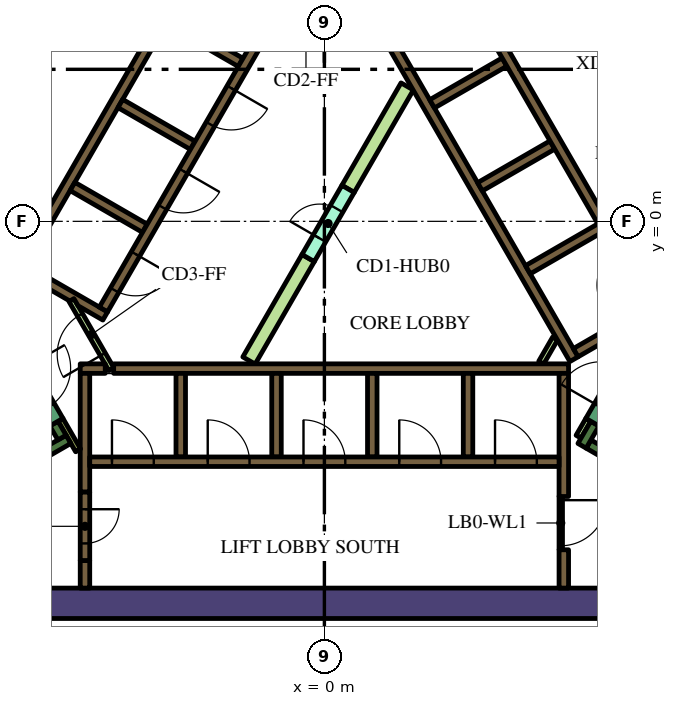
"""IFC4 building model, lengths in metres.
Left out: names, types, materials, properties, quantities, classifications, styles, units other than length and angle.
Written with IfcOpenShell. Run it as: python <this file> out.ifc"""

import sys

from ifc_helpers import new_model, si_unit, direction, frame, frame_2d, origin, place, context, subcontext, project, spatial, polyline, rectangle, outline, extrude, element, fill, save


model = new_model("IFC4")
c1 = context("Model", 3, precision=1e-05, world=origin(), true_north=direction((0.0, 1.0)))
c2 = subcontext(c1, "Body", "Model", "MODEL_VIEW")
j1 = project(units=[si_unit("LENGTHUNIT", "METRE"), si_unit("PLANEANGLEUNIT", "RADIAN")], contexts=[c1])
p1 = place(None, origin())
s1 = spatial("IfcSite", under=j1, at=p1, CompositionType="ELEMENT")
p2 = place(p1, origin())
s2 = spatial("IfcBuilding", under=s1, at=p2, CompositionType="ELEMENT")
p3 = place(p2, frame((0.0, 0.0, 183.6)))
s3 = spatial("IfcBuildingStorey", under=s2, at=p3, CompositionType="ELEMENT", Elevation=183.6)
p4 = place(p3, frame((-13.378, -10.05, 0.0), z_axis=(0.0, 0.0, 1.0), x_axis=(1.0, 0.0, 0.0)))
e1 = element("IfcWall", 1, at=p4, inside=s3, PredefinedType="SOLIDWALL", context=c2, shape_type="SweptSolid", body=[
    extrude(rectangle(XDim=22.282, YDim=0.8, at=frame_2d((11.141, 0.0))), origin(), (0.0, 0.0, 1.0), 4.2),
])
p5 = place(p3, frame((-12.668, -1.842, 0.0), z_axis=(0.0, 0.0, 1.0), x_axis=(0.500003640647, 0.866023301845, 0.0)))
e2 = element("IfcWall", 2, at=p5, inside=s3, PredefinedType="SOLIDWALL", context=c2, shape_type="SweptSolid", body=[
    extrude(rectangle(XDim=15.858, YDim=0.8, at=frame_2d((7.929, 0.0))), origin(), (0.0, 0.0, 1.0), 4.2),
])
p6 = place(p3, frame((12.84, -9.261, 0.0), z_axis=(0.0, 0.0, 1.0), x_axis=(-0.866013990052, 0.500019768644, 0.0)))
e3 = element("IfcWall", 3, at=p6, inside=s3, PredefinedType="SOLIDWALL", context=c2, shape_type="SweptSolid", body=[
    extrude(rectangle(XDim=6.8, YDim=0.25, at=frame_2d((3.4, 0.0))), origin(), (0.0, 0.0, 1.0), 4.2),
])
p7 = place(p3, frame((6.78, -5.906, 0.0), z_axis=(0.0, 0.0, 1.0), x_axis=(0.500223362819, 0.865896406789, 0.0)))
e4 = element("IfcWall", 4, at=p7, inside=s3, PredefinedType="SOLIDWALL", context=c2, shape_type="SweptSolid", body=[
    extrude(rectangle(XDim=0.675, YDim=0.25, at=frame_2d((0.337, 0.0))), origin(), (0.0, 0.0, 1.0), 4.2),
])
p8 = place(p3, frame((-12.84, -9.261, 0.0), z_axis=(0.0, 0.0, 1.0), x_axis=(0.866016039709, 0.500016218704, 0.0)))
e5 = element("IfcWall", 5, at=p8, inside=s3, PredefinedType="SOLIDWALL", context=c2, shape_type="SweptSolid", body=[
    extrude(rectangle(XDim=7.05, YDim=0.25, at=frame_2d((3.525, 0.0))), origin(), (0.0, 0.0, 1.0), 4.2),
])
p9 = place(p3, frame((-6.905, -5.69, 0.0), z_axis=(0.0, 0.0, 1.0), x_axis=(-0.500402024738, 0.865793170242, 0.0)))
e6 = element("IfcWall", 6, at=p9, inside=s3, PredefinedType="SOLIDWALL", context=c2, shape_type="SweptSolid", body=[
    extrude(rectangle(XDim=0.425, YDim=0.25, at=frame_2d((0.212, 0.0))), origin(), (0.0, 0.0, 1.0), 4.2),
])
p10 = place(p3, frame((-6.3, -8.925, 0.0), z_axis=(0.0, 0.0, 1.0), x_axis=(0.0, -1.0, 0.0)))
e7 = element("IfcWall", 7, at=p10, inside=s3, PredefinedType="SOLIDWALL", context=c2, shape_type="SweptSolid", body=[
    extrude(rectangle(XDim=0.725, YDim=0.25, at=frame_2d((0.363, 0.0))), origin(), (0.0, 0.0, 1.0), 4.2),
])
p11 = place(p3, frame((-5.545, -3.875, 0.0), z_axis=(0.0, 0.0, 1.0), x_axis=(1.0, 0.0, 0.0)))
e8 = element("IfcWall", 8, at=p11, inside=s3, PredefinedType="SOLIDWALL", context=c2, shape_type="SweptSolid", body=[
    extrude(rectangle(XDim=11.97, YDim=0.25, at=frame_2d((5.985, 0.0))), origin(), (0.0, 0.0, 1.0), 4.2),
])
p12 = place(p3, frame((-6.425, -3.875, 0.0), z_axis=(0.0, 0.0, 1.0), x_axis=(1.0, 0.0, 0.0)))
e9 = element("IfcWall", 9, at=p12, inside=s3, PredefinedType="SOLIDWALL", context=c2, shape_type="SweptSolid", body=[
    extrude(rectangle(XDim=0.658, YDim=0.25, at=frame_2d((0.329, 0.0))), origin(), (0.0, 0.0, 1.0), 4.2),
])
p13 = place(p3, frame((6.3, -7.24, 0.0), z_axis=(0.0, 0.0, 1.0), x_axis=(0.0, 1.0, 0.0)))
e10 = element("IfcWall", 10, at=p13, inside=s3, PredefinedType="SOLIDWALL", context=c2, shape_type="SweptSolid", body=[
    extrude(rectangle(XDim=3.24, YDim=0.25, at=frame_2d((1.62, 0.0))), origin(), (0.0, 0.0, 1.0), 4.2),
])
p14 = place(p3, frame((6.3, -9.65, 0.0), z_axis=(0.0, 0.0, 1.0), x_axis=(0.0, 1.0, 0.0)))
e11 = element("IfcWall", 11, at=p14, inside=s3, PredefinedType="SOLIDWALL", context=c2, shape_type="SweptSolid", body=[
    extrude(rectangle(XDim=1.008, YDim=0.25, at=frame_2d((0.504, 0.0))), origin(), (0.0, 0.0, 1.0), 4.2),
])
for number, where, z_axis, x_axis in (
    (12, (3.78, -4.0, 0.0), (0.0, 0.0, 1.0), (0.0, -1.0, 0.0)),
    (13, (1.26, -4.0, 0.0), (0.0, 0.0, 1.0), (0.0, -1.0, 0.0)),
    (14, (-1.26, -4.0, 0.0), (0.0, 0.0, 1.0), (0.0, -1.0, 0.0)),
    (15, (-3.78, -4.0, 0.0), (0.0, 0.0, 1.0), (0.0, -1.0, 0.0)),
):
    element("IfcWall", number, at=place(p3, frame(where, z_axis=z_axis, x_axis=x_axis)), inside=s3, PredefinedType="SOLIDWALL", context=c2, shape_type="SweptSolid", body=[
        extrude(rectangle(XDim=2.2, YDim=0.25, at=frame_2d((1.1, 0.0))), origin(), (0.0, 0.0, 1.0), 4.2),
    ])
p15 = place(p3, frame((-6.3, -7.125, 0.0), z_axis=(0.0, 0.0, 1.0), x_axis=(0.0, 1.0, 0.0)))
e16 = element("IfcWall", 16, at=p15, inside=s3, PredefinedType="SOLIDWALL", context=c2, shape_type="SweptSolid", body=[
    extrude(rectangle(XDim=3.125, YDim=0.25, at=frame_2d((1.562, 0.0))), origin(), (0.0, 0.0, 1.0), 4.2),
])
p16 = place(p3, frame((6.568, -3.627, 0.0), z_axis=(0.0, 0.0, 1.0), x_axis=(-0.499999455981, 0.866025717874, 0.0)))
e17 = element("IfcWall", 17, at=p16, inside=s3, PredefinedType="SOLIDWALL", context=c2, shape_type="SweptSolid", body=[
    extrude(rectangle(XDim=11.978, YDim=0.25, at=frame_2d((5.989, 0.0))), origin(), (0.0, 0.0, 1.0), 4.2),
])
for number, where, z_axis, x_axis in (
    (18, (2.834, 3.091, 0.0), (0.0, 0.0, 1.0), (0.866, 0.5, 0.0)),
    (19, (4.094, 0.909, 0.0), (0.0, 0.0, 1.0), (0.866, 0.5, 0.0)),
    (20, (5.354, -1.274, 0.0), (0.0, 0.0, 1.0), (0.866, 0.5, 0.0)),
):
    element("IfcWall", number, at=place(p3, frame(where, z_axis=z_axis, x_axis=x_axis)), inside=s3, PredefinedType="SOLIDWALL", context=c2, shape_type="SweptSolid", body=[
        extrude(rectangle(XDim=2.2, YDim=0.25, at=frame_2d((1.1, 0.0))), origin(), (0.0, 0.0, 1.0), 4.2),
    ])
p17 = place(p3, frame((6.614, -3.456, 0.0), z_axis=(0.0, 0.0, 1.0), x_axis=(0.866032512851, 0.499987686533, 0.0)))
e21 = element("IfcWall", 21, at=p17, inside=s3, PredefinedType="SOLIDWALL", context=c2, shape_type="SweptSolid", body=[
    extrude(rectangle(XDim=2.975, YDim=0.25, at=frame_2d((1.487, 0.0))), origin(), (0.0, 0.0, 1.0), 4.2),
])
p18 = place(p3, frame((-8.06, -1.311, 0.0), z_axis=(0.0, 0.0, 1.0), x_axis=(0.50000273126, 0.866023826885, 0.0)))
e22 = element("IfcWall", 22, at=p18, inside=s3, PredefinedType="SOLIDWALL", context=c2, shape_type="SweptSolid", body=[
    extrude(rectangle(XDim=10.33, YDim=0.25, at=frame_2d((5.165, 0.0))), origin(), (0.0, 0.0, 1.0), 4.2),
])
for number, where, z_axis, x_axis in (
    (23, (-2.204, 4.182, 0.0), (0.0, 0.0, 1.0), (-0.866, 0.5, 0.0)),
    (24, (-5.369, 3.1, 0.0), (0.0, 0.0, 1.0), (0.866, -0.5, 0.0)),
    (25, (-4.724, -0.182, 0.0), (0.0, 0.0, 1.0), (-0.866, 0.5, 0.0)),
):
    element("IfcWall", number, at=place(p3, frame(where, z_axis=z_axis, x_axis=x_axis)), inside=s3, PredefinedType="SOLIDWALL", context=c2, shape_type="SweptSolid", body=[
        extrude(rectangle(XDim=2.2, YDim=0.25, at=frame_2d((1.1, 0.0))), origin(), (0.0, 0.0, 1.0), 4.2),
    ])
p19 = place(p3, origin())
e26 = element("IfcWall", 26, at=p19, inside=s3, PredefinedType="SOLIDWALL", context=c2, shape_type="SweptSolid", body=[
    extrude(outline(polyline([(-5.922, -2.257), (-5.922, -2.257), (-5.705, -2.382), (-5.83, -2.598), (-6.483, -2.221), (-6.591, -2.033), (-6.591, -2.033), (-6.7, -2.096), (-7.952, -1.373), (-7.827, -1.156), (-5.922, -2.257)])), origin(), (0.0, 0.0, 1.0), 4.2),
])
p20 = place(p3, frame((-6.48, -6.027, 0.0), z_axis=(0.0, 0.0, 1.0), x_axis=(-0.499927229454, 0.866067413802, 0.0)))
e27 = element("IfcWall", 27, at=p20, inside=s3, PredefinedType="PARTITIONING", context=c2, shape_type="SweptSolid", body=[
    extrude(rectangle(XDim=0.929, YDim=0.15, at=frame_2d((0.464, 0.0))), origin(), (0.0, 0.0, 1.0), 4.2),
])
p21 = place(p3, frame((6.945, -5.222, 0.0), z_axis=(0.0, 0.0, 1.0), x_axis=(-0.499818422106, -0.866130212453, 0.0)))
e28 = element("IfcWall", 28, at=p21, inside=s3, PredefinedType="PARTITIONING", context=c2, shape_type="SweptSolid", body=[
    extrude(rectangle(XDim=0.514, YDim=0.15, at=frame_2d((0.257, 0.0))), origin(), (0.0, 0.0, 1.0), 3.15),
])
p22 = place(p3, frame((5.705, -3.718, 0.0), z_axis=(0.0, 0.0, 1.0), x_axis=(0.499962090823, 0.866047289552, 0.0)))
e29 = element("IfcWall", 29, at=p22, inside=s3, PredefinedType="PARTITIONING", context=c2, shape_type="SweptSolid", body=[
    extrude(rectangle(XDim=0.735, YDim=0.15, at=frame_2d((0.367, 0.0))), origin(), (0.0, 0.0, 1.0), 3.15),
])
e30 = element("IfcWall", 30, at=p19, inside=s3, PredefinedType="PARTITIONING", context=c2, shape_type="SweptSolid", body=[
    extrude(outline(polyline([(2.017, 3.643), (2.342, 3.456), (0.785, 0.76), (0.46, 0.947), (2.017, 3.643)])), origin(), (0.0, 0.0, 1.0), 3.15),
])
e31 = element("IfcWall", 31, at=p19, inside=s3, PredefinedType="PARTITIONING", context=c2, shape_type="SweptSolid", body=[
    extrude(outline(polyline([(-0.59, -0.872), (-0.265, -1.059), (-1.822, -3.756), (-2.147, -3.568), (-0.59, -0.872)])), origin(), (0.0, 0.0, 1.0), 3.15),
])
p23 = place(p3, frame((-6.175, -6.325, 0.0), z_axis=(0.0, 0.0, 1.0), x_axis=(1.0, 0.0, 0.0)))
e32 = element("IfcWall", 32, at=p23, inside=s3, PredefinedType="SOLIDWALL", context=c2, shape_type="SweptSolid", body=[
    extrude(rectangle(XDim=12.35, YDim=0.25, at=frame_2d((6.175, 0.0))), origin(), (0.0, 0.0, 1.0), 4.2),
])
p24 = place(p23, frame((0.585, 0.0, 0.0)))
e33 = element("IfcOpeningElement", 33, at=p24, cuts=e32, PredefinedType="OPENING", context=c2, shape_type="SweptSolid", body=[
    extrude(rectangle(XDim=1.1, YDim=2.1, at=frame_2d((0.55, 1.05))), frame((0.0, 0.135, 0.0), z_axis=(0.0, -1.0, 0.0), x_axis=(1.0, 0.0, 0.0)), (0.0, 0.0, 1.0), 0.27),
])
p25 = place(p23, frame((3.105, 0.0, 0.0)))
e34 = element("IfcOpeningElement", 34, at=p25, cuts=e32, PredefinedType="OPENING", context=c2, shape_type="SweptSolid", body=[
    extrude(rectangle(XDim=1.1, YDim=2.1, at=frame_2d((0.55, 1.05))), frame((0.0, 0.135, 0.0), z_axis=(0.0, -1.0, 0.0), x_axis=(1.0, 0.0, 0.0)), (0.0, 0.0, 1.0), 0.27),
])
p26 = place(p23, frame((5.625, 0.0, 0.0)))
e35 = element("IfcOpeningElement", 35, at=p26, cuts=e32, PredefinedType="OPENING", context=c2, shape_type="SweptSolid", body=[
    extrude(rectangle(XDim=1.1, YDim=2.1, at=frame_2d((0.55, 1.05))), frame((0.0, 0.135, 0.0), z_axis=(0.0, -1.0, 0.0), x_axis=(1.0, 0.0, 0.0)), (0.0, 0.0, 1.0), 0.27),
])
p27 = place(p23, frame((8.145, 0.0, 0.0)))
e36 = element("IfcOpeningElement", 36, at=p27, cuts=e32, PredefinedType="OPENING", context=c2, shape_type="SweptSolid", body=[
    extrude(rectangle(XDim=1.1, YDim=2.1, at=frame_2d((0.55, 1.05))), frame((0.0, 0.135, 0.0), z_axis=(0.0, -1.0, 0.0), x_axis=(1.0, 0.0, 0.0)), (0.0, 0.0, 1.0), 0.27),
])
p28 = place(p23, frame((10.665, 0.0, 0.0)))
e37 = element("IfcOpeningElement", 37, at=p28, cuts=e32, PredefinedType="OPENING", context=c2, shape_type="SweptSolid", body=[
    extrude(rectangle(XDim=1.1, YDim=2.1, at=frame_2d((0.55, 1.05))), frame((0.0, 0.135, 0.0), z_axis=(0.0, -1.0, 0.0), x_axis=(1.0, 0.0, 0.0)), (0.0, 0.0, 1.0), 0.27),
])
p29 = place(p3, frame((8.565, -2.185, 0.0), z_axis=(0.0, 0.0, 1.0), x_axis=(-0.499997954832, 0.866026584559, 0.0)))
e38 = element("IfcWall", 38, at=p29, inside=s3, PredefinedType="SOLIDWALL", context=c2, shape_type="SweptSolid", body=[
    extrude(rectangle(XDim=12.35, YDim=0.25, at=frame_2d((6.175, 0.0))), origin(), (0.0, 0.0, 1.0), 4.2),
])
p30 = place(p29, frame((0.585, 0.0, 0.0)))
e39 = element("IfcOpeningElement", 39, at=p30, cuts=e38, PredefinedType="OPENING", context=c2, shape_type="SweptSolid", body=[
    extrude(rectangle(XDim=1.1, YDim=2.1, at=frame_2d((0.55, 1.05))), frame((0.0, 0.135, 0.0), z_axis=(0.0, -1.0, 0.0), x_axis=(1.0, 0.0, 0.0)), (0.0, 0.0, 1.0), 0.27),
])
p31 = place(p3, frame((-0.898, 6.194, 0.0), z_axis=(0.0, 0.0, 1.0), x_axis=(-0.499996202215, -0.866027596426, 0.0)))
e40 = element("IfcWall", 40, at=p31, inside=s3, PredefinedType="SOLIDWALL", context=c2, shape_type="SweptSolid", body=[
    extrude(rectangle(XDim=9.83, YDim=0.25, at=frame_2d((4.915, 0.0))), origin(), (0.0, 0.0, 1.0), 4.2),
])
p32 = place(p31, frame((0.585, 0.0, 0.0)))
e41 = element("IfcOpeningElement", 41, at=p32, cuts=e40, PredefinedType="OPENING", context=c2, shape_type="SweptSolid", body=[
    extrude(rectangle(XDim=1.1, YDim=2.1, at=frame_2d((0.55, 1.05))), frame((0.0, 0.135, 0.0), z_axis=(0.0, -1.0, 0.0), x_axis=(1.0, 0.0, 0.0)), (0.0, 0.0, 1.0), 0.27),
])
p33 = place(p31, frame((3.105, 0.0, 0.0)))
e42 = element("IfcOpeningElement", 42, at=p33, cuts=e40, PredefinedType="OPENING", context=c2, shape_type="SweptSolid", body=[
    extrude(rectangle(XDim=1.1, YDim=2.1, at=frame_2d((0.55, 1.05))), frame((0.0, 0.135, 0.0), z_axis=(0.0, -1.0, 0.0), x_axis=(1.0, 0.0, 0.0)), (0.0, 0.0, 1.0), 0.27),
])
p34 = place(p31, frame((5.625, 0.0, 0.0)))
e43 = element("IfcOpeningElement", 43, at=p34, cuts=e40, PredefinedType="OPENING", context=c2, shape_type="SweptSolid", body=[
    extrude(rectangle(XDim=1.1, YDim=2.1, at=frame_2d((0.55, 1.05))), frame((0.0, 0.135, 0.0), z_axis=(0.0, -1.0, 0.0), x_axis=(1.0, 0.0, 0.0)), (0.0, 0.0, 1.0), 0.27),
])
p35 = place(p31, frame((8.145, 0.0, 0.0)))
e44 = element("IfcOpeningElement", 44, at=p35, cuts=e40, PredefinedType="OPENING", context=c2, shape_type="SweptSolid", body=[
    extrude(rectangle(XDim=1.1, YDim=2.1, at=frame_2d((0.55, 1.05))), frame((0.0, 0.135, 0.0), z_axis=(0.0, -1.0, 0.0), x_axis=(1.0, 0.0, 0.0)), (0.0, 0.0, 1.0), 0.27),
])
p36 = place(p3, frame((7.053, -5.284, 0.0), z_axis=(0.0, 0.0, 1.0), x_axis=(0.500078061341, 0.865980330357, 0.0)))
e45 = element("IfcWall", 45, at=p36, inside=s3, PredefinedType="SOLIDWALL", context=c2, shape_type="SweptSolid", body=[
    extrude(rectangle(XDim=2.1, YDim=0.4, at=frame_2d((1.05, 0.0))), origin(), (0.0, 0.0, 1.0), 4.2),
])
p37 = place(p36, frame((0.45, 0.0, 0.0)))
e46 = element("IfcOpeningElement", 46, at=p37, cuts=e45, PredefinedType="OPENING", context=c2, shape_type="SweptSolid", body=[
    extrude(rectangle(XDim=1.2, YDim=2.1, at=frame_2d((0.6, 1.05))), frame((0.0, 0.21, 0.0), z_axis=(0.0, -1.0, 0.0), x_axis=(1.0, 0.0, 0.0)), (0.0, 0.0, 1.0), 0.42),
])
p38 = place(p3, frame((-8.103, -3.466, 0.0), z_axis=(0.0, 0.0, 1.0), x_axis=(0.500078061341, -0.865980330357, 0.0)))
e47 = element("IfcWall", 47, at=p38, inside=s3, PredefinedType="SOLIDWALL", context=c2, shape_type="SweptSolid", body=[
    extrude(rectangle(XDim=2.1, YDim=0.4, at=frame_2d((1.05, 0.0))), origin(), (0.0, 0.0, 1.0), 4.2),
])
p39 = place(p38, frame((0.45, 0.0, 0.0)))
e48 = element("IfcOpeningElement", 48, at=p39, cuts=e47, PredefinedType="OPENING", context=c2, shape_type="SweptSolid", body=[
    extrude(rectangle(XDim=1.2, YDim=2.1, at=frame_2d((0.6, 1.05))), frame((0.0, 0.21, 0.0), z_axis=(0.0, -1.0, 0.0), x_axis=(1.0, 0.0, 0.0)), (0.0, 0.0, 1.0), 0.42),
])
p40 = place(p3, frame((-6.3, -7.125, 0.0), z_axis=(0.0, 0.0, 1.0), x_axis=(0.0, -1.0, 0.0)))
e49 = element("IfcWall", 49, at=p40, inside=s3, PredefinedType="SOLIDWALL", context=c2, shape_type="SweptSolid", body=[
    extrude(rectangle(XDim=1.8, YDim=0.25, at=frame_2d((0.9, 0.0))), origin(), (0.0, 0.0, 1.0), 4.2),
])
p41 = place(p40, frame((0.45, 0.0, 0.0)))
e50 = element("IfcOpeningElement", 50, at=p41, cuts=e49, PredefinedType="OPENING", context=c2, shape_type="SweptSolid", body=[
    extrude(rectangle(XDim=0.9, YDim=2.1, at=frame_2d((0.45, 1.05))), frame((0.0, 0.135, 0.0), z_axis=(0.0, -1.0, 0.0), x_axis=(1.0, 0.0, 0.0)), (0.0, 0.0, 1.0), 0.27),
])
p42 = place(p3, frame((-0.427, -0.966, 0.0), z_axis=(0.0, 0.0, 1.0), x_axis=(0.49994051562, 0.866059744384, 0.0)))
e51 = element("IfcWall", 51, at=p42, inside=s3, PredefinedType="PARTITIONING", context=c2, shape_type="SweptSolid", body=[
    extrude(rectangle(XDim=2.1, YDim=0.375, at=frame_2d((1.05, 0.0))), origin(), (0.0, 0.0, 1.0), 3.15),
])
p43 = place(p42, frame((0.6, 0.0, 0.0)))
e52 = element("IfcOpeningElement", 52, at=p43, cuts=e51, PredefinedType="OPENING", context=c2, shape_type="SweptSolid", body=[
    extrude(rectangle(XDim=0.9, YDim=2.1, at=frame_2d((0.45, 1.05))), frame((0.0, 0.198, 0.0), z_axis=(0.0, -1.0, 0.0), x_axis=(1.0, 0.0, 0.0)), (0.0, 0.0, 1.0), 0.395),
])
p44 = place(p3, frame((-5.606, -3.89, 0.0), z_axis=(0.0, 0.0, 1.0), x_axis=(-0.500027713859, 0.866009402589, 0.0)))
e53 = element("IfcWall", 53, at=p44, inside=s3, PredefinedType="PARTITIONING", context=c2, shape_type="SweptSolid", body=[
    extrude(rectangle(XDim=2.1, YDim=0.15, at=frame_2d((1.05, 0.0))), origin(), (0.0, 0.0, 1.0), 3.15),
])
p45 = place(p44, frame((0.45, 0.0, 0.0)))
e54 = element("IfcOpeningElement", 54, at=p45, cuts=e53, PredefinedType="OPENING", context=c2, shape_type="SweptSolid", body=[
    extrude(rectangle(XDim=1.2, YDim=2.1, at=frame_2d((0.6, 1.05))), frame((0.0, 0.085, 0.0), z_axis=(0.0, -1.0, 0.0), x_axis=(1.0, 0.0, 0.0)), (0.0, 0.0, 1.0), 0.17),
])
p46 = place(p3, frame((6.22, -7.237, 0.0), z_axis=(0.0, 0.0, 1.0), x_axis=(0.0, -1.0, 0.0)))
e55 = element("IfcWall", 55, at=p46, inside=s3, PredefinedType="PARTITIONING", context=c2, shape_type="SweptSolid", body=[
    extrude(rectangle(XDim=1.4, YDim=0.09, at=frame_2d((0.7, 0.0))), origin(), (0.0, 0.0, 1.0), 3.15),
])
p47 = place(p46, frame((0.1, 0.0, 0.0)))
e56 = element("IfcOpeningElement", 56, at=p47, cuts=e55, PredefinedType="OPENING", context=c2, shape_type="SweptSolid", body=[
    extrude(rectangle(XDim=1.2, YDim=2.1, at=frame_2d((0.6, 1.05))), frame((0.0, 0.055, 0.0), z_axis=(0.0, -1.0, 0.0), x_axis=(1.0, 0.0, 0.0)), (0.0, 0.0, 1.0), 0.11),
])
p48 = place(p24, origin())
e57 = element("IfcDoor", 57, at=p48, inside=s3, OperationType="DOUBLE_DOOR_SLIDING", PredefinedType="DOOR", context=c2, shape_type="SweptSolid", body=[
    extrude(rectangle(XDim=1.1, YDim=2.1, at=frame_2d((0.55, 1.05))), frame((0.0, 0.025, 0.0), z_axis=(0.0, -1.0, 0.0), x_axis=(1.0, 0.0, 0.0)), (0.0, 0.0, 1.0), 0.05),
])
fill(e33, e57)
p49 = place(p25, origin())
e58 = element("IfcDoor", 58, at=p49, inside=s3, OperationType="DOUBLE_DOOR_SLIDING", PredefinedType="DOOR", context=c2, shape_type="SweptSolid", body=[
    extrude(rectangle(XDim=1.1, YDim=2.1, at=frame_2d((0.55, 1.05))), frame((0.0, 0.025, 0.0), z_axis=(0.0, -1.0, 0.0), x_axis=(1.0, 0.0, 0.0)), (0.0, 0.0, 1.0), 0.05),
])
fill(e34, e58)
p50 = place(p26, origin())
e59 = element("IfcDoor", 59, at=p50, inside=s3, OperationType="DOUBLE_DOOR_SLIDING", PredefinedType="DOOR", context=c2, shape_type="SweptSolid", body=[
    extrude(rectangle(XDim=1.1, YDim=2.1, at=frame_2d((0.55, 1.05))), frame((0.0, 0.025, 0.0), z_axis=(0.0, -1.0, 0.0), x_axis=(1.0, 0.0, 0.0)), (0.0, 0.0, 1.0), 0.05),
])
fill(e35, e59)
p51 = place(p27, origin())
e60 = element("IfcDoor", 60, at=p51, inside=s3, OperationType="DOUBLE_DOOR_SLIDING", PredefinedType="DOOR", context=c2, shape_type="SweptSolid", body=[
    extrude(rectangle(XDim=1.1, YDim=2.1, at=frame_2d((0.55, 1.05))), frame((0.0, 0.025, 0.0), z_axis=(0.0, -1.0, 0.0), x_axis=(1.0, 0.0, 0.0)), (0.0, 0.0, 1.0), 0.05),
])
fill(e36, e60)
p52 = place(p28, origin())
e61 = element("IfcDoor", 61, at=p52, inside=s3, OperationType="DOUBLE_DOOR_SLIDING", PredefinedType="DOOR", context=c2, shape_type="SweptSolid", body=[
    extrude(rectangle(XDim=1.1, YDim=2.1, at=frame_2d((0.55, 1.05))), frame((0.0, 0.025, 0.0), z_axis=(0.0, -1.0, 0.0), x_axis=(1.0, 0.0, 0.0)), (0.0, 0.0, 1.0), 0.05),
])
fill(e37, e61)
p53 = place(p33, origin())
e62 = element("IfcDoor", 62, at=p53, inside=s3, OperationType="DOUBLE_DOOR_SLIDING", PredefinedType="DOOR", context=c2, shape_type="SweptSolid", body=[
    extrude(rectangle(XDim=1.1, YDim=2.1, at=frame_2d((0.55, 1.05))), frame((0.0, 0.025, 0.0), z_axis=(0.0, -1.0, 0.0), x_axis=(1.0, 0.0, 0.0)), (0.0, 0.0, 1.0), 0.05),
])
fill(e42, e62)
p54 = place(p34, origin())
e63 = element("IfcDoor", 63, at=p54, inside=s3, OperationType="DOUBLE_DOOR_SLIDING", PredefinedType="DOOR", context=c2, shape_type="SweptSolid", body=[
    extrude(rectangle(XDim=1.1, YDim=2.1, at=frame_2d((0.55, 1.05))), frame((0.0, 0.025, 0.0), z_axis=(0.0, -1.0, 0.0), x_axis=(1.0, 0.0, 0.0)), (0.0, 0.0, 1.0), 0.05),
])
fill(e43, e63)
p55 = place(p35, origin())
e64 = element("IfcDoor", 64, at=p55, inside=s3, OperationType="DOUBLE_DOOR_SLIDING", PredefinedType="DOOR", context=c2, shape_type="SweptSolid", body=[
    extrude(rectangle(XDim=1.1, YDim=2.1, at=frame_2d((0.55, 1.05))), frame((0.0, 0.025, 0.0), z_axis=(0.0, -1.0, 0.0), x_axis=(1.0, 0.0, 0.0)), (0.0, 0.0, 1.0), 0.05),
])
fill(e44, e64)
p56 = place(p41, origin())
e65 = element("IfcDoor", 65, at=p56, inside=s3, OperationType="SINGLE_SWING_LEFT", PredefinedType="DOOR", context=c2, shape_type="SweptSolid", body=[
    extrude(rectangle(XDim=0.9, YDim=2.1, at=frame_2d((0.45, 1.05))), frame((0.0, 0.025, 0.0), z_axis=(0.0, -1.0, 0.0), x_axis=(1.0, 0.0, 0.0)), (0.0, 0.0, 1.0), 0.05),
])
fill(e50, e65)
p57 = place(p43, origin())
e66 = element("IfcDoor", 66, at=p57, inside=s3, OperationType="SINGLE_SWING_LEFT", PredefinedType="DOOR", context=c2, shape_type="SweptSolid", body=[
    extrude(rectangle(XDim=0.9, YDim=2.1, at=frame_2d((0.45, 1.05))), frame((0.0, 0.025, 0.0), z_axis=(0.0, -1.0, 0.0), x_axis=(1.0, 0.0, 0.0)), (0.0, 0.0, 1.0), 0.05),
])
fill(e52, e66)
p58 = place(p45, origin())
e67 = element("IfcDoor", 67, at=p58, inside=s3, OperationType="SINGLE_SWING_LEFT", PredefinedType="DOOR", context=c2, shape_type="SweptSolid", body=[
    extrude(rectangle(XDim=1.2, YDim=2.1, at=frame_2d((0.6, 1.05))), frame((0.0, 0.025, 0.0), z_axis=(0.0, -1.0, 0.0), x_axis=(1.0, 0.0, 0.0)), (0.0, 0.0, 1.0), 0.05),
])
fill(e54, e67)
p59 = place(p47, origin())
e68 = element("IfcDoor", 68, at=p59, inside=s3, OperationType="SINGLE_SWING_LEFT", PredefinedType="DOOR", context=c2, shape_type="SweptSolid", body=[
    extrude(rectangle(XDim=1.2, YDim=2.1, at=frame_2d((0.6, 1.05))), frame((0.0, 0.025, 0.0), z_axis=(0.0, -1.0, 0.0), x_axis=(1.0, 0.0, 0.0)), (0.0, 0.0, 1.0), 0.05),
])
fill(e56, e68)
save(model, sys.argv[1])
